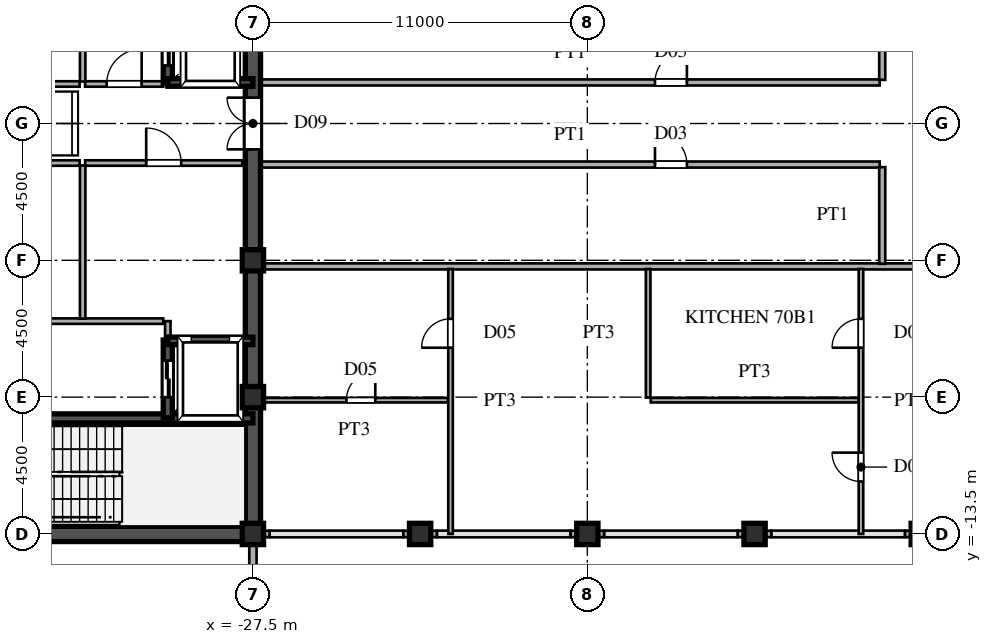
"""IFC4 building model, lengths in metres.
Left out: names, types, materials, properties, quantities, classifications, styles, units other than length and angle.
Written with IfcOpenShell. Run it as: python <this file> out.ifc"""

import sys

from ifc_helpers import new_model, si_unit, direction, frame, frame_2d, origin, origin_2d, place, context, subcontext, project, spatial, rectangle, hollow_rectangle, extrude, source, transform, mapped, element, fill, save


model = new_model("IFC4")
c1 = context("Model", 3, precision=1e-05, world=origin(), true_north=direction((0.0, 1.0)))
c2 = subcontext(c1, "Body", "Model", "MODEL_VIEW")
j1 = project(units=[si_unit("LENGTHUNIT", "METRE"), si_unit("PLANEANGLEUNIT", "RADIAN")], contexts=[c1])
p1 = place(None, origin())
s1 = spatial("IfcSite", under=j1, at=p1, CompositionType="ELEMENT")
p2 = place(p1, origin())
s2 = spatial("IfcBuilding", under=s1, at=p2, CompositionType="ELEMENT")
p3 = place(p2, frame((0.0, 0.0, 265.65)))
s3 = spatial("IfcBuildingStorey", under=s2, at=p3, CompositionType="ELEMENT", Elevation=265.65)
m1 = source(origin(), c2, "Body", "SweptSolid", [
    extrude(hollow_rectangle(XDim=0.7, YDim=0.7, WallThickness=0.03, at=origin_2d()), origin(), (0.0, 0.0, 1.0), 3.75),
])
for number, where, z_axis, x_axis in (
    (1, (-27.5, -13.5, 0.0), (0.0, 0.0, 1.0), (1.0, 0.0, 0.0)),
    (2, (-27.5, -9.0, 0.0), (0.0, 0.0, 1.0), (1.0, 0.0, 0.0)),
    (3, (-27.5, -4.5, 0.0), (0.0, 0.0, 1.0), (1.0, 0.0, 0.0)),
    (4, (-22.0, -13.5, 0.0), (0.0, 0.0, 1.0), (1.0, 0.0, 0.0)),
    (5, (-16.5, -13.5, 0.0), (0.0, 0.0, 1.0), (1.0, 0.0, 0.0)),
    (6, (-11.0, -13.5, 0.0), (0.0, 0.0, 1.0), (1.0, 0.0, 0.0)),
    (7, (-5.5, -13.5, 0.0), (0.0, 0.0, 1.0), (1.0, 0.0, 0.0)),
):
    element("IfcColumn", number, at=place(p3, frame(where, z_axis=z_axis, x_axis=x_axis)), inside=s3, PredefinedType="COLUMN", context=c2, shape_type="MappedRepresentation", body=[
        mapped(m1, transform((0.0, 0.0, 0.0), scale=1.0)),
    ])
p4 = place(p3, frame((-27.5, -15.98, 0.0), z_axis=(0.0, 0.0, 1.0), x_axis=(0.0, 1.0, 0.0)))
e8 = element("IfcWall", 8, at=p4, inside=s3, PredefinedType="SOLIDWALL", context=c2, shape_type="SweptSolid", body=[
    extrude(rectangle(XDim=1.605, YDim=0.24, at=frame_2d((0.803, 0.0))), origin(), (0.0, 0.0, 1.0), 3.49),
])
p5 = place(p3, frame((-27.5, -14.375, 0.0), z_axis=(0.0, 0.0, 1.0), x_axis=(0.0, 1.0, 0.0)))
e9 = element("IfcWall", 9, at=p5, inside=s3, PredefinedType="SOLIDWALL", context=c2, shape_type="SweptSolid", body=[
    extrude(rectangle(XDim=0.62, YDim=0.24, at=frame_2d((0.31, 0.0))), origin(), (0.0, 0.0, 1.0), 2.99),
])
p6 = place(p3, frame((-27.49, -13.5, 0.0), z_axis=(0.0, 0.0, 1.0), x_axis=(1.0, 0.0, 0.0)))
e10 = element("IfcWall", 10, at=p6, inside=s3, PredefinedType="SOLIDWALL", context=c2, shape_type="SweptSolid", body=[
    extrude(rectangle(XDim=0.54, YDim=0.21, at=frame_2d((0.27, 0.0))), origin(), (0.0, 0.0, 1.0), 2.99),
])
for number, where, z_axis, x_axis in (
    (11, (-22.55, -13.5, 0.0), (0.0, 0.0, 1.0), (1.0, 0.0, 0.0)),
    (12, (-17.05, -13.5, 0.0), (0.0, 0.0, 1.0), (1.0, 0.0, 0.0)),
    (13, (-11.55, -13.5, 0.0), (0.0, 0.0, 1.0), (1.0, 0.0, 0.0)),
    (14, (-6.05, -13.5, 0.0), (0.0, 0.0, 1.0), (1.0, 0.0, 0.0)),
):
    element("IfcWall", number, at=place(p3, frame(where, z_axis=z_axis, x_axis=x_axis)), inside=s3, PredefinedType="SOLIDWALL", context=c2, shape_type="SweptSolid", body=[
        extrude(rectangle(XDim=1.1, YDim=0.21, at=frame_2d((0.55, 0.0))), origin(), (0.0, 0.0, 1.0), 2.99),
    ])
for number, where, z_axis, x_axis in (
    (15, (-27.5, -13.5, 0.0), (0.0, 0.0, 1.0), (0.0, 1.0, 0.0)),
    (16, (-27.5, 1.3, 0.0), (0.0, 0.0, 1.0), (0.0, 1.0, 0.0)),
):
    element("IfcWall", number, at=place(p3, frame(where, z_axis=z_axis, x_axis=x_axis)), inside=s3, PredefinedType="SHEAR", context=c2, shape_type="SweptSolid", body=[
        extrude(rectangle(XDim=12.2, YDim=0.5, at=frame_2d((6.1, 0.0))), origin(), (0.0, 0.0, 1.0), 3.49),
    ])
p7 = place(p3, frame((-27.5, -1.3, 0.0), z_axis=(0.0, 0.0, 1.0), x_axis=(0.0, 1.0, 0.0)))
e17 = element("IfcWall", 17, at=p7, inside=s3, PredefinedType="SHEAR", context=c2, shape_type="SweptSolid", body=[
    extrude(rectangle(XDim=2.6, YDim=0.5, at=frame_2d((1.3, 0.0))), origin(), (0.0, 0.0, 1.0), 3.49),
])
p8 = place(p7, frame((0.45, 0.0, 0.0)))
e18 = element("IfcOpeningElement", 18, at=p8, cuts=e17, PredefinedType="OPENING", context=c2, shape_type="SweptSolid", body=[
    extrude(rectangle(XDim=1.7, YDim=2.35, at=frame_2d((0.85, 1.175))), frame((0.0, 0.26, 0.0), z_axis=(0.0, -1.0, 0.0), x_axis=(1.0, 0.0, 0.0)), (0.0, 0.0, 1.0), 0.52),
])
p9 = place(p3, frame((-36.5, -13.5, 0.0), z_axis=(0.0, 0.0, 1.0), x_axis=(1.0, 0.0, 0.0)))
e19 = element("IfcWall", 19, at=p9, inside=s3, PredefinedType="SHEAR", context=c2, shape_type="SweptSolid", body=[
    extrude(rectangle(XDim=9.0, YDim=0.5, at=frame_2d((4.5, 0.0))), origin(), (0.0, 0.0, 1.0), 3.49),
])
p10 = place(p3, frame((-36.5, -9.7, 0.0), z_axis=(0.0, 0.0, 1.0), x_axis=(1.0, 0.0, 0.0)))
e20 = element("IfcWall", 20, at=p10, inside=s3, PredefinedType="SHEAR", context=c2, shape_type="SweptSolid", body=[
    extrude(rectangle(XDim=9.0, YDim=0.3, at=frame_2d((4.5, 0.0))), origin(), (0.0, 0.0, 1.0), 3.49),
])
p11 = place(p10, frame((0.6, 0.0, 0.0)))
e21 = element("IfcOpeningElement", 21, at=p11, cuts=e20, PredefinedType="OPENING", context=c2, shape_type="SweptSolid", body=[
    extrude(rectangle(XDim=1.1, YDim=2.2, at=frame_2d((0.55, 1.1))), frame((0.0, 0.16, 0.0), z_axis=(0.0, -1.0, 0.0), x_axis=(1.0, 0.0, 0.0)), (0.0, 0.0, 1.0), 0.32),
])
for number, where, z_axis, x_axis in (
    (22, (-30.3, -7.15, 0.0), (0.0, 0.0, 1.0), (1.0, 0.0, 0.0)),
    (23, (-30.3, 1.35, 0.0), (0.0, 0.0, 1.0), (1.0, 0.0, 0.0)),
):
    element("IfcWall", number, at=place(p3, frame(where, z_axis=z_axis, x_axis=x_axis)), inside=s3, PredefinedType="SHEAR", context=c2, shape_type="SweptSolid", body=[
        extrude(rectangle(XDim=2.8, YDim=0.25, at=frame_2d((1.4, 0.0))), origin(), (0.0, 0.0, 1.0), 3.49),
    ])
p12 = place(p3, frame((-30.3, -9.68, 0.0), z_axis=(0.0, 0.0, 1.0), x_axis=(0.0, 1.0, 0.0)))
e24 = element("IfcWall", 24, at=p12, inside=s3, PredefinedType="SHEAR", context=c2, shape_type="SweptSolid", body=[
    extrude(rectangle(XDim=2.56, YDim=0.3, at=frame_2d((1.28, 0.0))), origin(), (0.0, 0.0, 1.0), 3.49),
])
p13 = place(p12, frame((0.68, 0.0, 0.0)))
e25 = element("IfcOpeningElement", 25, at=p13, cuts=e24, PredefinedType="OPENING", context=c2, shape_type="SweptSolid", body=[
    extrude(rectangle(XDim=1.2, YDim=2.25, at=frame_2d((0.6, 1.125))), frame((0.0, 0.16, 0.0), z_axis=(0.0, -1.0, 0.0), x_axis=(1.0, 0.0, 0.0)), (0.0, 0.0, 1.0), 0.32),
])
p14 = place(p3, frame((-30.3, 1.32, 0.0), z_axis=(0.0, 0.0, 1.0), x_axis=(0.0, 1.0, 0.0)))
e26 = element("IfcWall", 26, at=p14, inside=s3, PredefinedType="SHEAR", context=c2, shape_type="SweptSolid", body=[
    extrude(rectangle(XDim=2.28, YDim=0.3, at=frame_2d((1.14, 0.0))), origin(), (0.0, 0.0, 1.0), 3.49),
])
p15 = place(p14, frame((0.59, 0.0, 0.0)))
e27 = element("IfcOpeningElement", 27, at=p15, cuts=e26, PredefinedType="OPENING", context=c2, shape_type="SweptSolid", body=[
    extrude(rectangle(XDim=1.1, YDim=2.2, at=frame_2d((0.55, 1.1))), frame((0.0, 0.16, 0.0), z_axis=(0.0, -1.0, 0.0), x_axis=(1.0, 0.0, 0.0)), (0.0, 0.0, 1.0), 0.32),
])
p16 = place(p3, frame((-36.15, -6.5, 0.0), z_axis=(0.0, 0.0, 1.0), x_axis=(1.0, 0.0, 0.0)))
e28 = element("IfcWall", 28, at=p16, inside=s3, PredefinedType="PARTITIONING", context=c2, shape_type="SweptSolid", body=[
    extrude(rectangle(XDim=5.7, YDim=0.18, at=frame_2d((2.85, 0.0))), origin(), (0.0, 0.0, 1.0), 3.49),
])
p17 = place(p3, frame((-30.3, -7.12, 0.0), z_axis=(0.0, 0.0, 1.0), x_axis=(0.0, 1.0, 0.0)))
e29 = element("IfcWall", 29, at=p17, inside=s3, PredefinedType="PARTITIONING", context=c2, shape_type="SweptSolid", body=[
    extrude(rectangle(XDim=0.62, YDim=0.18, at=frame_2d((0.31, 0.0))), origin(), (0.0, 0.0, 1.0), 3.49),
])
p18 = place(p3, frame((-33.1, -6.42, 0.0), z_axis=(0.0, 0.0, 1.0), x_axis=(0.0, 1.0, 0.0)))
e30 = element("IfcWall", 30, at=p18, inside=s3, PredefinedType="PARTITIONING", context=c2, shape_type="SweptSolid", body=[
    extrude(rectangle(XDim=5.04, YDim=0.18, at=frame_2d((2.52, 0.0))), origin(), (0.0, 0.0, 1.0), 3.49),
])
p19 = place(p3, frame((-33.1, 1.38, 0.0), z_axis=(0.0, 0.0, 1.0), x_axis=(0.0, 1.0, 0.0)))
e31 = element("IfcWall", 31, at=p19, inside=s3, PredefinedType="PARTITIONING", context=c2, shape_type="SweptSolid", body=[
    extrude(rectangle(XDim=6.74, YDim=0.18, at=frame_2d((3.37, 0.0))), origin(), (0.0, 0.0, 1.0), 3.49),
])
p20 = place(p3, frame((-33.02, -1.3, 0.0), z_axis=(0.0, 0.0, 1.0), x_axis=(1.0, 0.0, 0.0)))
e32 = element("IfcWall", 32, at=p20, inside=s3, PredefinedType="PARTITIONING", context=c2, shape_type="SweptSolid", body=[
    extrude(rectangle(XDim=5.17, YDim=0.18, at=frame_2d((2.585, 0.0))), origin(), (0.0, 0.0, 1.0), 3.49),
])
p21 = place(p20, frame((2.01, 0.0, 0.0)))
e33 = element("IfcOpeningElement", 33, at=p21, cuts=e32, PredefinedType="OPENING", context=c2, shape_type="SweptSolid", body=[
    extrude(rectangle(XDim=1.15, YDim=2.2, at=frame_2d((0.575, 1.1))), frame((0.0, 0.1, 0.0), z_axis=(0.0, -1.0, 0.0), x_axis=(1.0, 0.0, 0.0)), (0.0, 0.0, 1.0), 0.2),
])
p22 = place(p3, frame((-33.02, 1.3, 0.0), z_axis=(0.0, 0.0, 1.0), x_axis=(1.0, 0.0, 0.0)))
e34 = element("IfcWall", 34, at=p22, inside=s3, PredefinedType="PARTITIONING", context=c2, shape_type="SweptSolid", body=[
    extrude(rectangle(XDim=2.57, YDim=0.18, at=frame_2d((1.285, 0.0))), origin(), (0.0, 0.0, 1.0), 3.49),
])
p23 = place(p22, frame((0.71, 0.0, 0.0)))
e35 = element("IfcOpeningElement", 35, at=p23, cuts=e34, PredefinedType="OPENING", context=c2, shape_type="SweptSolid", body=[
    extrude(rectangle(XDim=1.15, YDim=2.2, at=frame_2d((0.575, 1.1))), frame((0.0, 0.1, 0.0), z_axis=(0.0, -1.0, 0.0), x_axis=(1.0, 0.0, 0.0)), (0.0, 0.0, 1.0), 0.2),
])
for number, where, z_axis, x_axis in (
    (36, (-36.15, -1.3, 0.0), (0.0, 0.0, 1.0), (1.0, 0.0, 0.0)),
    (37, (-36.15, 1.3, 0.0), (0.0, 0.0, 1.0), (1.0, 0.0, 0.0)),
):
    element("IfcWall", number, at=place(p3, frame(where, z_axis=z_axis, x_axis=x_axis)), inside=s3, PredefinedType="PARTITIONING", context=c2, shape_type="SweptSolid", body=[
        extrude(rectangle(XDim=2.95, YDim=0.18, at=frame_2d((1.475, 0.0))), origin(), (0.0, 0.0, 1.0), 3.49),
    ])
p24 = place(p3, frame((-27.245, -9.1, 0.0), z_axis=(0.0, 0.0, 1.0), x_axis=(1.0, 0.0, 0.0)))
e38 = element("IfcWall", 38, at=p24, inside=s3, PredefinedType="PARTITIONING", context=c2, shape_type="SweptSolid", body=[
    extrude(rectangle(XDim=6.16, YDim=0.15, at=frame_2d((3.08, 0.0))), origin(), (0.0, 0.0, 1.0), 3.49),
])
p25 = place(p24, frame((2.82, 0.0, 0.0)))
e39 = element("IfcOpeningElement", 39, at=p25, cuts=e38, PredefinedType="OPENING", context=c2, shape_type="SweptSolid", body=[
    extrude(rectangle(XDim=0.95, YDim=2.15, at=frame_2d((0.475, 1.075))), frame((0.0, 0.085, 0.0), z_axis=(0.0, -1.0, 0.0), x_axis=(1.0, 0.0, 0.0)), (0.0, 0.0, 1.0), 0.17),
])
p26 = place(p3, frame((-14.415, -9.1, 0.0), z_axis=(0.0, 0.0, 1.0), x_axis=(1.0, 0.0, 0.0)))
e40 = element("IfcWall", 40, at=p26, inside=s3, PredefinedType="PARTITIONING", context=c2, shape_type="SweptSolid", body=[
    extrude(rectangle(XDim=6.83, YDim=0.15, at=frame_2d((3.415, 0.0))), origin(), (0.0, 0.0, 1.0), 3.49),
])
p27 = place(p3, frame((-27.245, -4.7, 0.0), z_axis=(0.0, 0.0, 1.0), x_axis=(1.0, 0.0, 0.0)))
e41 = element("IfcWall", 41, at=p27, inside=s3, PredefinedType="PARTITIONING", context=c2, shape_type="SweptSolid", body=[
    extrude(rectangle(XDim=54.49, YDim=0.2, at=frame_2d((27.245, 0.0))), origin(), (0.0, 0.0, 1.0), 3.49),
])
p28 = place(p27, frame((22.47, 0.0, 0.0)))
e42 = element("IfcOpeningElement", 42, at=p28, cuts=e41, PredefinedType="OPENING", context=c2, shape_type="SweptSolid", body=[
    extrude(rectangle(XDim=1.05, YDim=2.25, at=frame_2d((0.525, 1.125))), frame((0.0, 0.11, 0.0), z_axis=(0.0, -1.0, 0.0), x_axis=(1.0, 0.0, 0.0)), (0.0, 0.0, 1.0), 0.22),
])
p29 = place(p3, frame((-27.245, -1.35, 0.0), z_axis=(0.0, 0.0, 1.0), x_axis=(1.0, 0.0, 0.0)))
e43 = element("IfcWall", 43, at=p29, inside=s3, PredefinedType="PARTITIONING", context=c2, shape_type="SweptSolid", body=[
    extrude(rectangle(XDim=20.36, YDim=0.2, at=frame_2d((10.18, 0.0))), origin(), (0.0, 0.0, 1.0), 3.49),
])
p30 = place(p29, frame((12.97, 0.0, 0.0)))
e44 = element("IfcOpeningElement", 44, at=p30, cuts=e43, PredefinedType="OPENING", context=c2, shape_type="SweptSolid", body=[
    extrude(rectangle(XDim=1.05, YDim=2.25, at=frame_2d((0.525, 1.125))), frame((0.0, 0.11, 0.0), z_axis=(0.0, -1.0, 0.0), x_axis=(1.0, 0.0, 0.0)), (0.0, 0.0, 1.0), 0.22),
])
p31 = place(p3, frame((-27.245, 1.35, 0.0), z_axis=(0.0, 0.0, 1.0), x_axis=(1.0, 0.0, 0.0)))
e45 = element("IfcWall", 45, at=p31, inside=s3, PredefinedType="PARTITIONING", context=c2, shape_type="SweptSolid", body=[
    extrude(rectangle(XDim=20.36, YDim=0.2, at=frame_2d((10.18, 0.0))), origin(), (0.0, 0.0, 1.0), 3.49),
])
p32 = place(p31, frame((12.97, 0.0, 0.0)))
e46 = element("IfcOpeningElement", 46, at=p32, cuts=e45, PredefinedType="OPENING", context=c2, shape_type="SweptSolid", body=[
    extrude(rectangle(XDim=1.05, YDim=2.25, at=frame_2d((0.525, 1.125))), frame((0.0, 0.11, 0.0), z_axis=(0.0, -1.0, 0.0), x_axis=(1.0, 0.0, 0.0)), (0.0, 0.0, 1.0), 0.22),
])
p33 = place(p3, frame((-21.0, -13.5, 0.0), z_axis=(0.0, 0.0, 1.0), x_axis=(0.0, 1.0, 0.0)))
e47 = element("IfcWall", 47, at=p33, inside=s3, PredefinedType="PARTITIONING", context=c2, shape_type="SweptSolid", body=[
    extrude(rectangle(XDim=8.715, YDim=0.15, at=frame_2d((4.357, 0.0))), origin(), (0.0, 0.0, 1.0), 3.49),
])
p34 = place(p33, frame((6.125, 0.0, 0.0)))
e48 = element("IfcOpeningElement", 48, at=p34, cuts=e47, PredefinedType="OPENING", context=c2, shape_type="SweptSolid", body=[
    extrude(rectangle(XDim=0.95, YDim=2.15, at=frame_2d((0.475, 1.075))), frame((0.0, 0.085, 0.0), z_axis=(0.0, -1.0, 0.0), x_axis=(1.0, 0.0, 0.0)), (0.0, 0.0, 1.0), 0.17),
])
p35 = place(p3, frame((-14.5, -9.015, 0.0), z_axis=(0.0, 0.0, 1.0), x_axis=(0.0, 1.0, 0.0)))
e49 = element("IfcWall", 49, at=p35, inside=s3, PredefinedType="PARTITIONING", context=c2, shape_type="SweptSolid", body=[
    extrude(rectangle(XDim=4.23, YDim=0.15, at=frame_2d((2.115, 0.0))), origin(), (0.0, 0.0, 1.0), 3.49),
])
p36 = place(p3, frame((-7.5, -13.5, 0.0), z_axis=(0.0, 0.0, 1.0), x_axis=(0.0, 1.0, 0.0)))
e50 = element("IfcWall", 50, at=p36, inside=s3, PredefinedType="PARTITIONING", context=c2, shape_type="SweptSolid", body=[
    extrude(rectangle(XDim=8.715, YDim=0.15, at=frame_2d((4.357, 0.0))), origin(), (0.0, 0.0, 1.0), 3.49),
])
p37 = place(p36, frame((6.125, 0.0, 0.0)))
e51 = element("IfcOpeningElement", 51, at=p37, cuts=e50, PredefinedType="OPENING", context=c2, shape_type="SweptSolid", body=[
    extrude(rectangle(XDim=0.95, YDim=2.15, at=frame_2d((0.475, 1.075))), frame((0.0, 0.085, 0.0), z_axis=(0.0, -1.0, 0.0), x_axis=(1.0, 0.0, 0.0)), (0.0, 0.0, 1.0), 0.17),
])
p38 = place(p36, frame((1.725, 0.0, 0.0)))
e52 = element("IfcOpeningElement", 52, at=p38, cuts=e50, PredefinedType="OPENING", context=c2, shape_type="SweptSolid", body=[
    extrude(rectangle(XDim=0.95, YDim=2.15, at=frame_2d((0.475, 1.075))), frame((0.0, 0.085, 0.0), z_axis=(0.0, -1.0, 0.0), x_axis=(1.0, 0.0, 0.0)), (0.0, 0.0, 1.0), 0.17),
])
for number, where, z_axis, x_axis in (
    (53, (-6.8, -4.615, 0.0), (0.0, 0.0, 1.0), (0.0, 1.0, 0.0)),
    (54, (-6.8, 1.435, 0.0), (0.0, 0.0, 1.0), (0.0, 1.0, 0.0)),
):
    element("IfcWall", number, at=place(p3, frame(where, z_axis=z_axis, x_axis=x_axis)), inside=s3, PredefinedType="PARTITIONING", context=c2, shape_type="SweptSolid", body=[
        extrude(rectangle(XDim=3.18, YDim=0.2, at=frame_2d((1.59, 0.0))), origin(), (0.0, 0.0, 1.0), 3.49),
    ])
m2 = source(origin(), c2, "Body", "SweptSolid", [
    extrude(rectangle(XDim=1.7, YDim=2.35, at=frame_2d((0.85, 1.175))), frame((0.0, 0.025, 0.0), z_axis=(0.0, -1.0, 0.0), x_axis=(1.0, 0.0, 0.0)), (0.0, 0.0, 1.0), 0.05),
])
p39 = place(p8, origin())
e55 = element("IfcDoor", 55, at=p39, inside=s3, OperationType="DOUBLE_SWING_LEFT", PredefinedType="DOOR", context=c2, shape_type="MappedRepresentation", body=[
    mapped(m2, transform((0.0, 0.0, 0.0), scale=1.0)),
])
fill(e18, e55)
m3 = source(origin(), c2, "Body", "SweptSolid", [
    extrude(rectangle(XDim=1.2, YDim=2.25, at=frame_2d((0.6, 1.125))), frame((0.0, 0.025, 0.0), z_axis=(0.0, -1.0, 0.0), x_axis=(1.0, 0.0, 0.0)), (0.0, 0.0, 1.0), 0.05),
])
p40 = place(p13, origin())
e56 = element("IfcDoor", 56, at=p40, inside=s3, OperationType="DOUBLE_DOOR_SLIDING", PredefinedType="DOOR", context=c2, shape_type="MappedRepresentation", body=[
    mapped(m3, transform((0.0, 0.0, 0.0), scale=1.0)),
])
fill(e25, e56)
m4 = source(origin(), c2, "Body", "SweptSolid", [
    extrude(rectangle(XDim=1.1, YDim=2.2, at=frame_2d((0.55, 1.1))), frame((0.0, 0.025, 0.0), z_axis=(0.0, -1.0, 0.0), x_axis=(1.0, 0.0, 0.0)), (0.0, 0.0, 1.0), 0.05),
])
p41 = place(p15, origin())
e57 = element("IfcDoor", 57, at=p41, inside=s3, OperationType="DOUBLE_DOOR_SLIDING", PredefinedType="DOOR", context=c2, shape_type="MappedRepresentation", body=[
    mapped(m4, transform((0.0, 0.0, 0.0), scale=1.0)),
])
fill(e27, e57)
m5 = source(origin(), c2, "Body", "SweptSolid", [
    extrude(rectangle(XDim=1.15, YDim=2.2, at=frame_2d((0.575, 1.1))), frame((0.0, 0.025, 0.0), z_axis=(0.0, -1.0, 0.0), x_axis=(1.0, 0.0, 0.0)), (0.0, 0.0, 1.0), 0.05),
])
p42 = place(p21, origin())
e58 = element("IfcDoor", 58, at=p42, inside=s3, OperationType="SINGLE_SWING_LEFT", PredefinedType="DOOR", context=c2, shape_type="MappedRepresentation", body=[
    mapped(m5, transform((0.0, 0.0, 0.0), scale=1.0)),
])
fill(e33, e58)
p43 = place(p23, origin())
e59 = element("IfcDoor", 59, at=p43, inside=s3, OperationType="SINGLE_SWING_RIGHT", PredefinedType="DOOR", context=c2, shape_type="MappedRepresentation", body=[
    mapped(m5, transform((0.0, 0.0, 0.0), scale=1.0)),
])
fill(e35, e59)
m6 = source(origin(), c2, "Body", "SweptSolid", [
    extrude(rectangle(XDim=0.95, YDim=2.15, at=frame_2d((0.475, 1.075))), frame((0.0, 0.025, 0.0), z_axis=(0.0, -1.0, 0.0), x_axis=(1.0, 0.0, 0.0)), (0.0, 0.0, 1.0), 0.05),
])
p44 = place(p25, origin())
e60 = element("IfcDoor", 60, at=p44, inside=s3, OperationType="SINGLE_SWING_RIGHT", PredefinedType="DOOR", context=c2, shape_type="MappedRepresentation", body=[
    mapped(m6, transform((0.0, 0.0, 0.0), scale=1.0)),
])
fill(e39, e60)
m7 = source(origin(), c2, "Body", "SweptSolid", [
    extrude(rectangle(XDim=1.05, YDim=2.25, at=frame_2d((0.525, 1.125))), frame((0.0, 0.025, 0.0), z_axis=(0.0, -1.0, 0.0), x_axis=(1.0, 0.0, 0.0)), (0.0, 0.0, 1.0), 0.05),
])
p45 = place(p30, origin())
e61 = element("IfcDoor", 61, at=p45, inside=s3, OperationType="SINGLE_SWING_LEFT", PredefinedType="DOOR", context=c2, shape_type="MappedRepresentation", body=[
    mapped(m7, transform((0.0, 0.0, 0.0), scale=1.0)),
])
fill(e44, e61)
p46 = place(p32, origin())
e62 = element("IfcDoor", 62, at=p46, inside=s3, OperationType="SINGLE_SWING_RIGHT", PredefinedType="DOOR", context=c2, shape_type="MappedRepresentation", body=[
    mapped(m7, transform((0.0, 0.0, 0.0), scale=1.0)),
])
fill(e46, e62)
p47 = place(p34, origin())
e63 = element("IfcDoor", 63, at=p47, inside=s3, OperationType="SINGLE_SWING_LEFT", PredefinedType="DOOR", context=c2, shape_type="MappedRepresentation", body=[
    mapped(m6, transform((0.0, 0.0, 0.0), scale=1.0)),
])
fill(e48, e63)
p48 = place(p37, origin())
e64 = element("IfcDoor", 64, at=p48, inside=s3, OperationType="SINGLE_SWING_LEFT", PredefinedType="DOOR", context=c2, shape_type="MappedRepresentation", body=[
    mapped(m6, transform((0.0, 0.0, 0.0), scale=1.0)),
])
fill(e51, e64)
p49 = place(p38, origin())
e65 = element("IfcDoor", 65, at=p49, inside=s3, OperationType="SINGLE_SWING_RIGHT", PredefinedType="DOOR", context=c2, shape_type="MappedRepresentation", body=[
    mapped(m6, transform((0.0, 0.0, 0.0), scale=1.0)),
])
fill(e52, e65)
save(model, sys.argv[1])
